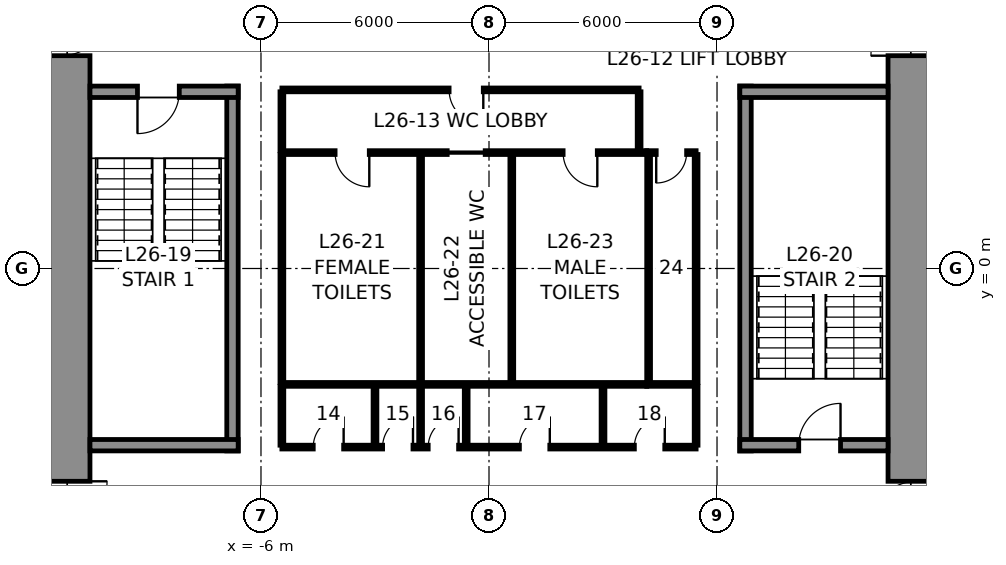
"""IFC4 building model, lengths in metres.
Left out: names, types, materials, properties, quantities, classifications, styles, units other than length and angle.
Written with IfcOpenShell. Run it as: python <this file> out.ifc"""

import sys

from ifc_helpers import new_model, si_unit, direction, frame, frame_2d, origin, place, context, subcontext, project, spatial, rectangle, extrude, element, fill, save


model = new_model("IFC4")
c1 = context("Model", 3, precision=1e-05, world=origin(), true_north=direction((0.0, 1.0)))
c2 = subcontext(c1, "Body", "Model", "MODEL_VIEW")
j1 = project(units=[si_unit("LENGTHUNIT", "METRE"), si_unit("PLANEANGLEUNIT", "RADIAN")], contexts=[c1])
p1 = place(None, origin())
s1 = spatial("IfcSite", under=j1, at=p1, CompositionType="ELEMENT")
p2 = place(p1, origin())
s2 = spatial("IfcBuilding", under=s1, at=p2, CompositionType="ELEMENT")
p3 = place(p2, frame((0.0, 0.0, 131.8)))
s3 = spatial("IfcBuildingStorey", under=s2, at=p3, CompositionType="ELEMENT", Elevation=131.8)
p4 = place(p3, frame((11.25, 10.5, 0.0), z_axis=(0.0, 0.0, 1.0), x_axis=(0.0, -1.0, 0.0)))
e1 = element("IfcWall", 1, at=p4, inside=s3, PredefinedType="SHEAR", context=c2, shape_type="SweptSolid", body=[
    extrude(rectangle(XDim=21.0, YDim=1.5, at=frame_2d((10.5, 0.0))), origin(), (0.0, 0.0, 1.0), 4.0),
])
p5 = place(p4, frame((3.7, 0.0, 0.0)))
e2 = element("IfcOpeningElement", 2, at=p5, cuts=e1, PredefinedType="OPENING", context=c2, shape_type="SweptSolid", body=[
    extrude(rectangle(XDim=1.2, YDim=2.3, at=frame_2d((0.6, 1.15))), frame((0.0, 0.76, 0.0), z_axis=(0.0, -1.0, 0.0), x_axis=(1.0, 0.0, 0.0)), (0.0, 0.0, 1.0), 1.52),
])
p6 = place(p4, frame((16.1, 0.0, 0.0)))
e3 = element("IfcOpeningElement", 3, at=p6, cuts=e1, PredefinedType="OPENING", context=c2, shape_type="SweptSolid", body=[
    extrude(rectangle(XDim=1.2, YDim=2.3, at=frame_2d((0.6, 1.15))), frame((0.0, 0.76, 0.0), z_axis=(0.0, -1.0, 0.0), x_axis=(1.0, 0.0, 0.0)), (0.0, 0.0, 1.0), 1.52),
])
p7 = place(p3, frame((-11.25, -10.5, 0.0), z_axis=(0.0, 0.0, 1.0), x_axis=(0.0, 1.0, 0.0)))
e4 = element("IfcWall", 4, at=p7, inside=s3, PredefinedType="SHEAR", context=c2, shape_type="SweptSolid", body=[
    extrude(rectangle(XDim=21.0, YDim=1.5, at=frame_2d((10.5, 0.0))), origin(), (0.0, 0.0, 1.0), 4.0),
])
p8 = place(p7, frame((16.1, 0.0, 0.0)))
e5 = element("IfcOpeningElement", 5, at=p8, cuts=e4, PredefinedType="OPENING", context=c2, shape_type="SweptSolid", body=[
    extrude(rectangle(XDim=1.2, YDim=2.3, at=frame_2d((0.6, 1.15))), frame((0.0, 0.76, 0.0), z_axis=(0.0, -1.0, 0.0), x_axis=(1.0, 0.0, 0.0)), (0.0, 0.0, 1.0), 1.52),
])
p9 = place(p7, frame((3.7, 0.0, 0.0)))
e6 = element("IfcOpeningElement", 6, at=p9, cuts=e4, PredefinedType="OPENING", context=c2, shape_type="SweptSolid", body=[
    extrude(rectangle(XDim=1.2, YDim=2.3, at=frame_2d((0.6, 1.15))), frame((0.0, 0.76, 0.0), z_axis=(0.0, -1.0, 0.0), x_axis=(1.0, 0.0, 0.0)), (0.0, 0.0, 1.0), 1.52),
])
p10 = place(p3, frame((-6.75, -4.8, 0.0), z_axis=(0.0, 0.0, 1.0), x_axis=(0.0, 1.0, 0.0)))
e7 = element("IfcWall", 7, at=p10, inside=s3, PredefinedType="SOLIDWALL", context=c2, shape_type="SweptSolid", body=[
    extrude(rectangle(XDim=9.6, YDim=0.3, at=frame_2d((4.8, 0.0))), origin(), (0.0, 0.0, 1.0), 3.75),
])
p11 = place(p3, frame((-10.5, 4.65, 0.0), z_axis=(0.0, 0.0, 1.0), x_axis=(1.0, 0.0, 0.0)))
e8 = element("IfcWall", 8, at=p11, inside=s3, PredefinedType="SOLIDWALL", context=c2, shape_type="SweptSolid", body=[
    extrude(rectangle(XDim=3.9, YDim=0.3, at=frame_2d((1.95, 0.0))), origin(), (0.0, 0.0, 1.0), 3.75),
])
p12 = place(p11, frame((1.25, 0.0, 0.0)))
e9 = element("IfcOpeningElement", 9, at=p12, cuts=e8, PredefinedType="OPENING", context=c2, shape_type="SweptSolid", body=[
    extrude(rectangle(XDim=1.1, YDim=2.3, at=frame_2d((0.55, 1.15))), frame((0.0, 0.16, 0.0), z_axis=(0.0, -1.0, 0.0), x_axis=(1.0, 0.0, 0.0)), (0.0, 0.0, 1.0), 0.32),
])
p13 = place(p3, frame((-6.6, -4.65, 0.0), z_axis=(0.0, 0.0, 1.0), x_axis=(-1.0, 0.0, 0.0)))
e10 = element("IfcWall", 10, at=p13, inside=s3, PredefinedType="SOLIDWALL", context=c2, shape_type="SweptSolid", body=[
    extrude(rectangle(XDim=3.9, YDim=0.3, at=frame_2d((1.95, 0.0))), origin(), (0.0, 0.0, 1.0), 3.75),
])
p14 = place(p3, frame((6.75, -4.8, 0.0), z_axis=(0.0, 0.0, 1.0), x_axis=(0.0, 1.0, 0.0)))
e11 = element("IfcWall", 11, at=p14, inside=s3, PredefinedType="SOLIDWALL", context=c2, shape_type="SweptSolid", body=[
    extrude(rectangle(XDim=9.6, YDim=0.3, at=frame_2d((4.8, 0.0))), origin(), (0.0, 0.0, 1.0), 3.75),
])
p15 = place(p3, frame((6.6, 4.65, 0.0), z_axis=(0.0, 0.0, 1.0), x_axis=(1.0, 0.0, 0.0)))
e12 = element("IfcWall", 12, at=p15, inside=s3, PredefinedType="SOLIDWALL", context=c2, shape_type="SweptSolid", body=[
    extrude(rectangle(XDim=3.9, YDim=0.3, at=frame_2d((1.95, 0.0))), origin(), (0.0, 0.0, 1.0), 3.75),
])
p16 = place(p3, frame((10.5, -4.65, 0.0), z_axis=(0.0, 0.0, 1.0), x_axis=(-1.0, 0.0, 0.0)))
e13 = element("IfcWall", 13, at=p16, inside=s3, PredefinedType="SOLIDWALL", context=c2, shape_type="SweptSolid", body=[
    extrude(rectangle(XDim=3.9, YDim=0.3, at=frame_2d((1.95, 0.0))), origin(), (0.0, 0.0, 1.0), 3.75),
])
p17 = place(p16, frame((1.25, 0.0, 0.0)))
e14 = element("IfcOpeningElement", 14, at=p17, cuts=e13, PredefinedType="OPENING", context=c2, shape_type="SweptSolid", body=[
    extrude(rectangle(XDim=1.1, YDim=2.3, at=frame_2d((0.55, 1.15))), frame((0.0, 0.16, 0.0), z_axis=(0.0, -1.0, 0.0), x_axis=(1.0, 0.0, 0.0)), (0.0, 0.0, 1.0), 0.32),
])
p18 = place(p3, frame((-5.45, 3.05, 0.0), z_axis=(0.0, 0.0, 1.0), x_axis=(1.0, 0.0, 0.0)))
e15 = element("IfcWall", 15, at=p18, inside=s3, PredefinedType="PARTITIONING", context=c2, shape_type="SweptSolid", body=[
    extrude(rectangle(XDim=9.6, YDim=0.1, at=frame_2d((4.8, 0.0))), origin(), (0.0, 0.0, 1.0), 3.75),
])
p19 = place(p18, frame((1.4, 0.0, 0.0)))
e16 = element("IfcOpeningElement", 16, at=p19, cuts=e15, PredefinedType="OPENING", context=c2, shape_type="SweptSolid", body=[
    extrude(rectangle(XDim=0.9, YDim=2.3, at=frame_2d((0.45, 1.15))), frame((0.0, 0.06, 0.0), z_axis=(0.0, -1.0, 0.0), x_axis=(1.0, 0.0, 0.0)), (0.0, 0.0, 1.0), 0.12),
])
p20 = place(p18, frame((4.35, 0.0, 0.0)))
e17 = element("IfcOpeningElement", 17, at=p20, cuts=e15, PredefinedType="OPENING", context=c2, shape_type="SweptSolid", body=[
    extrude(rectangle(XDim=1.0, YDim=2.3, at=frame_2d((0.5, 1.15))), frame((0.0, 0.06, 0.0), z_axis=(0.0, -1.0, 0.0), x_axis=(1.0, 0.0, 0.0)), (0.0, 0.0, 1.0), 0.12),
])
p21 = place(p18, frame((7.4, 0.0, 0.0)))
e18 = element("IfcOpeningElement", 18, at=p21, cuts=e15, PredefinedType="OPENING", context=c2, shape_type="SweptSolid", body=[
    extrude(rectangle(XDim=0.9, YDim=2.3, at=frame_2d((0.45, 1.15))), frame((0.0, 0.06, 0.0), z_axis=(0.0, -1.0, 0.0), x_axis=(1.0, 0.0, 0.0)), (0.0, 0.0, 1.0), 0.12),
])
p22 = place(p3, frame((4.15, 3.05, 0.0), z_axis=(0.0, 0.0, 1.0), x_axis=(1.0, 0.0, 0.0)))
e19 = element("IfcWall", 19, at=p22, inside=s3, PredefinedType="PARTITIONING", context=c2, shape_type="SweptSolid", body=[
    extrude(rectangle(XDim=1.3, YDim=0.1, at=frame_2d((0.65, 0.0))), origin(), (0.0, 0.0, 1.0), 3.75),
])
p23 = place(p22, frame((0.25, 0.0, 0.0)))
e20 = element("IfcOpeningElement", 20, at=p23, cuts=e19, PredefinedType="OPENING", context=c2, shape_type="SweptSolid", body=[
    extrude(rectangle(XDim=0.8, YDim=2.3, at=frame_2d((0.4, 1.15))), frame((0.0, 0.06, 0.0), z_axis=(0.0, -1.0, 0.0), x_axis=(1.0, 0.0, 0.0)), (0.0, 0.0, 1.0), 0.12),
])
p24 = place(p3, frame((4.15, -3.05, 0.0), z_axis=(0.0, 0.0, 1.0), x_axis=(-1.0, 0.0, 0.0)))
e21 = element("IfcWall", 21, at=p24, inside=s3, PredefinedType="PARTITIONING", context=c2, shape_type="SweptSolid", body=[
    extrude(rectangle(XDim=9.6, YDim=0.1, at=frame_2d((4.8, 0.0))), origin(), (0.0, 0.0, 1.0), 3.75),
])
p25 = place(p3, frame((5.45, -3.05, 0.0), z_axis=(0.0, 0.0, 1.0), x_axis=(-1.0, 0.0, 0.0)))
e22 = element("IfcWall", 22, at=p25, inside=s3, PredefinedType="PARTITIONING", context=c2, shape_type="SweptSolid", body=[
    extrude(rectangle(XDim=1.3, YDim=0.1, at=frame_2d((0.65, 0.0))), origin(), (0.0, 0.0, 1.0), 3.75),
])
for number, where, z_axis, x_axis in (
    (23, (5.45, 3.0, 0.0), (0.0, 0.0, 1.0), (0.0, -1.0, 0.0)),
    (24, (-5.45, -3.0, 0.0), (0.0, 0.0, 1.0), (0.0, 1.0, 0.0)),
    (25, (-1.8, -3.0, 0.0), (0.0, 0.0, 1.0), (0.0, 1.0, 0.0)),
    (26, (0.6, -3.0, 0.0), (0.0, 0.0, 1.0), (0.0, 1.0, 0.0)),
    (27, (4.2, -3.0, 0.0), (0.0, 0.0, 1.0), (0.0, 1.0, 0.0)),
):
    element("IfcWall", number, at=place(p3, frame(where, z_axis=z_axis, x_axis=x_axis)), inside=s3, PredefinedType="PARTITIONING", context=c2, shape_type="SweptSolid", body=[
        extrude(rectangle(XDim=6.0, YDim=0.1, at=frame_2d((3.0, 0.0))), origin(), (0.0, 0.0, 1.0), 3.75),
    ])
p26 = place(p3, frame((-5.45, 4.7, 0.0), z_axis=(0.0, 0.0, 1.0), x_axis=(1.0, 0.0, 0.0)))
e28 = element("IfcWall", 28, at=p26, inside=s3, PredefinedType="PARTITIONING", context=c2, shape_type="SweptSolid", body=[
    extrude(rectangle(XDim=9.4, YDim=0.1, at=frame_2d((4.7, 0.0))), origin(), (0.0, 0.0, 1.0), 3.75),
])
p27 = place(p26, frame((4.4, 0.0, 0.0)))
e29 = element("IfcOpeningElement", 29, at=p27, cuts=e28, PredefinedType="OPENING", context=c2, shape_type="SweptSolid", body=[
    extrude(rectangle(XDim=0.9, YDim=2.3, at=frame_2d((0.45, 1.15))), frame((0.0, 0.06, 0.0), z_axis=(0.0, -1.0, 0.0), x_axis=(1.0, 0.0, 0.0)), (0.0, 0.0, 1.0), 0.12),
])
for number, where, z_axis, x_axis in (
    (30, (-5.45, 3.1, 0.0), (0.0, 0.0, 1.0), (0.0, 1.0, 0.0)),
    (31, (3.95, 3.1, 0.0), (0.0, 0.0, 1.0), (0.0, 1.0, 0.0)),
):
    element("IfcWall", number, at=place(p3, frame(where, z_axis=z_axis, x_axis=x_axis)), inside=s3, PredefinedType="PARTITIONING", context=c2, shape_type="SweptSolid", body=[
        extrude(rectangle(XDim=1.55, YDim=0.1, at=frame_2d((0.775, 0.0))), origin(), (0.0, 0.0, 1.0), 3.75),
    ])
p28 = place(p3, frame((5.45, -4.7, 0.0), z_axis=(0.0, 0.0, 1.0), x_axis=(-1.0, 0.0, 0.0)))
e32 = element("IfcWall", 32, at=p28, inside=s3, PredefinedType="PARTITIONING", context=c2, shape_type="SweptSolid", body=[
    extrude(rectangle(XDim=10.9, YDim=0.1, at=frame_2d((5.45, 0.0))), origin(), (0.0, 0.0, 1.0), 3.75),
])
p29 = place(p28, frame((9.275, 0.0, 0.0)))
e33 = element("IfcOpeningElement", 33, at=p29, cuts=e32, PredefinedType="OPENING", context=c2, shape_type="SweptSolid", body=[
    extrude(rectangle(XDim=0.8, YDim=2.3, at=frame_2d((0.4, 1.15))), frame((0.0, 0.06, 0.0), z_axis=(0.0, -1.0, 0.0), x_axis=(1.0, 0.0, 0.0)), (0.0, 0.0, 1.0), 0.12),
])
p30 = place(p28, frame((7.45, 0.0, 0.0)))
e34 = element("IfcOpeningElement", 34, at=p30, cuts=e32, PredefinedType="OPENING", context=c2, shape_type="SweptSolid", body=[
    extrude(rectangle(XDim=0.8, YDim=2.3, at=frame_2d((0.4, 1.15))), frame((0.0, 0.06, 0.0), z_axis=(0.0, -1.0, 0.0), x_axis=(1.0, 0.0, 0.0)), (0.0, 0.0, 1.0), 0.12),
])
p31 = place(p28, frame((6.25, 0.0, 0.0)))
e35 = element("IfcOpeningElement", 35, at=p31, cuts=e32, PredefinedType="OPENING", context=c2, shape_type="SweptSolid", body=[
    extrude(rectangle(XDim=0.8, YDim=2.3, at=frame_2d((0.4, 1.15))), frame((0.0, 0.06, 0.0), z_axis=(0.0, -1.0, 0.0), x_axis=(1.0, 0.0, 0.0)), (0.0, 0.0, 1.0), 0.12),
])
p32 = place(p28, frame((3.85, 0.0, 0.0)))
e36 = element("IfcOpeningElement", 36, at=p32, cuts=e32, PredefinedType="OPENING", context=c2, shape_type="SweptSolid", body=[
    extrude(rectangle(XDim=0.8, YDim=2.3, at=frame_2d((0.4, 1.15))), frame((0.0, 0.06, 0.0), z_axis=(0.0, -1.0, 0.0), x_axis=(1.0, 0.0, 0.0)), (0.0, 0.0, 1.0), 0.12),
])
p33 = place(p28, frame((0.825, 0.0, 0.0)))
e37 = element("IfcOpeningElement", 37, at=p33, cuts=e32, PredefinedType="OPENING", context=c2, shape_type="SweptSolid", body=[
    extrude(rectangle(XDim=0.8, YDim=2.3, at=frame_2d((0.4, 1.15))), frame((0.0, 0.06, 0.0), z_axis=(0.0, -1.0, 0.0), x_axis=(1.0, 0.0, 0.0)), (0.0, 0.0, 1.0), 0.12),
])
for number, where, z_axis, x_axis in (
    (38, (-5.45, -3.1, 0.0), (0.0, 0.0, 1.0), (0.0, -1.0, 0.0)),
    (39, (5.45, -3.1, 0.0), (0.0, 0.0, 1.0), (0.0, -1.0, 0.0)),
    (40, (-3.0, -3.1, 0.0), (0.0, 0.0, 1.0), (0.0, -1.0, 0.0)),
    (41, (-1.8, -3.1, 0.0), (0.0, 0.0, 1.0), (0.0, -1.0, 0.0)),
    (42, (-0.6, -3.1, 0.0), (0.0, 0.0, 1.0), (0.0, -1.0, 0.0)),
    (43, (3.0, -3.1, 0.0), (0.0, 0.0, 1.0), (0.0, -1.0, 0.0)),
):
    element("IfcWall", number, at=place(p3, frame(where, z_axis=z_axis, x_axis=x_axis)), inside=s3, PredefinedType="PARTITIONING", context=c2, shape_type="SweptSolid", body=[
        extrude(rectangle(XDim=1.55, YDim=0.1, at=frame_2d((0.775, 0.0))), origin(), (0.0, 0.0, 1.0), 3.75),
    ])
p34 = place(p12, frame((1.1, 0.0, 0.0), z_axis=(0.0, 0.0, 1.0), x_axis=(-1.0, 0.0, 0.0)))
e44 = element("IfcDoor", 44, at=p34, inside=s3, OperationType="SINGLE_SWING_RIGHT", PredefinedType="DOOR", context=c2, shape_type="SweptSolid", body=[
    extrude(rectangle(XDim=1.1, YDim=2.3, at=frame_2d((0.55, 1.15))), frame((0.0, 0.025, 0.0), z_axis=(0.0, -1.0, 0.0), x_axis=(1.0, 0.0, 0.0)), (0.0, 0.0, 1.0), 0.05),
])
fill(e9, e44)
p35 = place(p17, frame((1.1, 0.0, 0.0), z_axis=(0.0, 0.0, 1.0), x_axis=(-1.0, 0.0, 0.0)))
e45 = element("IfcDoor", 45, at=p35, inside=s3, OperationType="SINGLE_SWING_RIGHT", PredefinedType="DOOR", context=c2, shape_type="SweptSolid", body=[
    extrude(rectangle(XDim=1.1, YDim=2.3, at=frame_2d((0.55, 1.15))), frame((0.0, 0.025, 0.0), z_axis=(0.0, -1.0, 0.0), x_axis=(1.0, 0.0, 0.0)), (0.0, 0.0, 1.0), 0.05),
])
fill(e14, e45)
p36 = place(p19, frame((0.9, 0.0, 0.0), z_axis=(0.0, 0.0, 1.0), x_axis=(-1.0, 0.0, 0.0)))
e46 = element("IfcDoor", 46, at=p36, inside=s3, OperationType="SINGLE_SWING_LEFT", PredefinedType="DOOR", context=c2, shape_type="SweptSolid", body=[
    extrude(rectangle(XDim=0.9, YDim=2.3, at=frame_2d((0.45, 1.15))), frame((0.0, 0.025, 0.0), z_axis=(0.0, -1.0, 0.0), x_axis=(1.0, 0.0, 0.0)), (0.0, 0.0, 1.0), 0.05),
])
fill(e16, e46)
p37 = place(p20, frame((1.0, 0.0, 0.0), z_axis=(0.0, 0.0, 1.0), x_axis=(-1.0, 0.0, 0.0)))
e47 = element("IfcDoor", 47, at=p37, inside=s3, OperationType="SLIDING_TO_LEFT", PredefinedType="DOOR", context=c2, shape_type="SweptSolid", body=[
    extrude(rectangle(XDim=1.0, YDim=2.3, at=frame_2d((0.5, 1.15))), frame((0.0, 0.025, 0.0), z_axis=(0.0, -1.0, 0.0), x_axis=(1.0, 0.0, 0.0)), (0.0, 0.0, 1.0), 0.05),
])
fill(e17, e47)
p38 = place(p21, frame((0.9, 0.0, 0.0), z_axis=(0.0, 0.0, 1.0), x_axis=(-1.0, 0.0, 0.0)))
e48 = element("IfcDoor", 48, at=p38, inside=s3, OperationType="SINGLE_SWING_LEFT", PredefinedType="DOOR", context=c2, shape_type="SweptSolid", body=[
    extrude(rectangle(XDim=0.9, YDim=2.3, at=frame_2d((0.45, 1.15))), frame((0.0, 0.025, 0.0), z_axis=(0.0, -1.0, 0.0), x_axis=(1.0, 0.0, 0.0)), (0.0, 0.0, 1.0), 0.05),
])
fill(e18, e48)
p39 = place(p23, frame((0.8, 0.0, 0.0), z_axis=(0.0, 0.0, 1.0), x_axis=(-1.0, 0.0, 0.0)))
e49 = element("IfcDoor", 49, at=p39, inside=s3, OperationType="SINGLE_SWING_RIGHT", PredefinedType="DOOR", context=c2, shape_type="SweptSolid", body=[
    extrude(rectangle(XDim=0.8, YDim=2.3, at=frame_2d((0.4, 1.15))), frame((0.0, 0.025, 0.0), z_axis=(0.0, -1.0, 0.0), x_axis=(1.0, 0.0, 0.0)), (0.0, 0.0, 1.0), 0.05),
])
fill(e20, e49)
p40 = place(p27, frame((0.9, 0.0, 0.0), z_axis=(0.0, 0.0, 1.0), x_axis=(-1.0, 0.0, 0.0)))
e50 = element("IfcDoor", 50, at=p40, inside=s3, OperationType="SINGLE_SWING_LEFT", PredefinedType="DOOR", context=c2, shape_type="SweptSolid", body=[
    extrude(rectangle(XDim=0.9, YDim=2.3, at=frame_2d((0.45, 1.15))), frame((0.0, 0.025, 0.0), z_axis=(0.0, -1.0, 0.0), x_axis=(1.0, 0.0, 0.0)), (0.0, 0.0, 1.0), 0.05),
])
fill(e29, e50)
p41 = place(p29, frame((0.8, 0.0, 0.0), z_axis=(0.0, 0.0, 1.0), x_axis=(-1.0, 0.0, 0.0)))
e51 = element("IfcDoor", 51, at=p41, inside=s3, OperationType="SINGLE_SWING_RIGHT", PredefinedType="DOOR", context=c2, shape_type="SweptSolid", body=[
    extrude(rectangle(XDim=0.8, YDim=2.3, at=frame_2d((0.4, 1.15))), frame((0.0, 0.025, 0.0), z_axis=(0.0, -1.0, 0.0), x_axis=(1.0, 0.0, 0.0)), (0.0, 0.0, 1.0), 0.05),
])
fill(e33, e51)
p42 = place(p30, frame((0.8, 0.0, 0.0), z_axis=(0.0, 0.0, 1.0), x_axis=(-1.0, 0.0, 0.0)))
e52 = element("IfcDoor", 52, at=p42, inside=s3, OperationType="SINGLE_SWING_RIGHT", PredefinedType="DOOR", context=c2, shape_type="SweptSolid", body=[
    extrude(rectangle(XDim=0.8, YDim=2.3, at=frame_2d((0.4, 1.15))), frame((0.0, 0.025, 0.0), z_axis=(0.0, -1.0, 0.0), x_axis=(1.0, 0.0, 0.0)), (0.0, 0.0, 1.0), 0.05),
])
fill(e34, e52)
p43 = place(p31, frame((0.8, 0.0, 0.0), z_axis=(0.0, 0.0, 1.0), x_axis=(-1.0, 0.0, 0.0)))
e53 = element("IfcDoor", 53, at=p43, inside=s3, OperationType="SINGLE_SWING_RIGHT", PredefinedType="DOOR", context=c2, shape_type="SweptSolid", body=[
    extrude(rectangle(XDim=0.8, YDim=2.3, at=frame_2d((0.4, 1.15))), frame((0.0, 0.025, 0.0), z_axis=(0.0, -1.0, 0.0), x_axis=(1.0, 0.0, 0.0)), (0.0, 0.0, 1.0), 0.05),
])
fill(e35, e53)
p44 = place(p32, frame((0.8, 0.0, 0.0), z_axis=(0.0, 0.0, 1.0), x_axis=(-1.0, 0.0, 0.0)))
e54 = element("IfcDoor", 54, at=p44, inside=s3, OperationType="SINGLE_SWING_RIGHT", PredefinedType="DOOR", context=c2, shape_type="SweptSolid", body=[
    extrude(rectangle(XDim=0.8, YDim=2.3, at=frame_2d((0.4, 1.15))), frame((0.0, 0.025, 0.0), z_axis=(0.0, -1.0, 0.0), x_axis=(1.0, 0.0, 0.0)), (0.0, 0.0, 1.0), 0.05),
])
fill(e36, e54)
p45 = place(p33, frame((0.8, 0.0, 0.0), z_axis=(0.0, 0.0, 1.0), x_axis=(-1.0, 0.0, 0.0)))
e55 = element("IfcDoor", 55, at=p45, inside=s3, OperationType="SINGLE_SWING_RIGHT", PredefinedType="DOOR", context=c2, shape_type="SweptSolid", body=[
    extrude(rectangle(XDim=0.8, YDim=2.3, at=frame_2d((0.4, 1.15))), frame((0.0, 0.025, 0.0), z_axis=(0.0, -1.0, 0.0), x_axis=(1.0, 0.0, 0.0)), (0.0, 0.0, 1.0), 0.05),
])
fill(e37, e55)
p46 = place(p8, frame((1.2, 0.0, 0.0), z_axis=(0.0, 0.0, 1.0), x_axis=(-1.0, 0.0, 0.0)))
e56 = element("IfcDoor", 56, at=p46, inside=s3, OperationType="SINGLE_SWING_LEFT", PredefinedType="DOOR", context=c2, shape_type="SweptSolid", body=[
    extrude(rectangle(XDim=1.2, YDim=2.3, at=frame_2d((0.6, 1.15))), frame((0.0, 0.025, 0.0), z_axis=(0.0, -1.0, 0.0), x_axis=(1.0, 0.0, 0.0)), (0.0, 0.0, 1.0), 0.05),
])
fill(e5, e56)
p47 = place(p9, frame((1.2, 0.0, 0.0), z_axis=(0.0, 0.0, 1.0), x_axis=(-1.0, 0.0, 0.0)))
e57 = element("IfcDoor", 57, at=p47, inside=s3, OperationType="SINGLE_SWING_LEFT", PredefinedType="DOOR", context=c2, shape_type="SweptSolid", body=[
    extrude(rectangle(XDim=1.2, YDim=2.3, at=frame_2d((0.6, 1.15))), frame((0.0, 0.025, 0.0), z_axis=(0.0, -1.0, 0.0), x_axis=(1.0, 0.0, 0.0)), (0.0, 0.0, 1.0), 0.05),
])
fill(e6, e57)
p48 = place(p5, frame((1.2, 0.0, 0.0), z_axis=(0.0, 0.0, 1.0), x_axis=(-1.0, 0.0, 0.0)))
e58 = element("IfcDoor", 58, at=p48, inside=s3, OperationType="SINGLE_SWING_LEFT", PredefinedType="DOOR", context=c2, shape_type="SweptSolid", body=[
    extrude(rectangle(XDim=1.2, YDim=2.3, at=frame_2d((0.6, 1.15))), frame((0.0, 0.025, 0.0), z_axis=(0.0, -1.0, 0.0), x_axis=(1.0, 0.0, 0.0)), (0.0, 0.0, 1.0), 0.05),
])
fill(e2, e58)
p49 = place(p6, frame((1.2, 0.0, 0.0), z_axis=(0.0, 0.0, 1.0), x_axis=(-1.0, 0.0, 0.0)))
e59 = element("IfcDoor", 59, at=p49, inside=s3, OperationType="SINGLE_SWING_LEFT", PredefinedType="DOOR", context=c2, shape_type="SweptSolid", body=[
    extrude(rectangle(XDim=1.2, YDim=2.3, at=frame_2d((0.6, 1.15))), frame((0.0, 0.025, 0.0), z_axis=(0.0, -1.0, 0.0), x_axis=(1.0, 0.0, 0.0)), (0.0, 0.0, 1.0), 0.05),
])
fill(e3, e59)
save(model, sys.argv[1])
